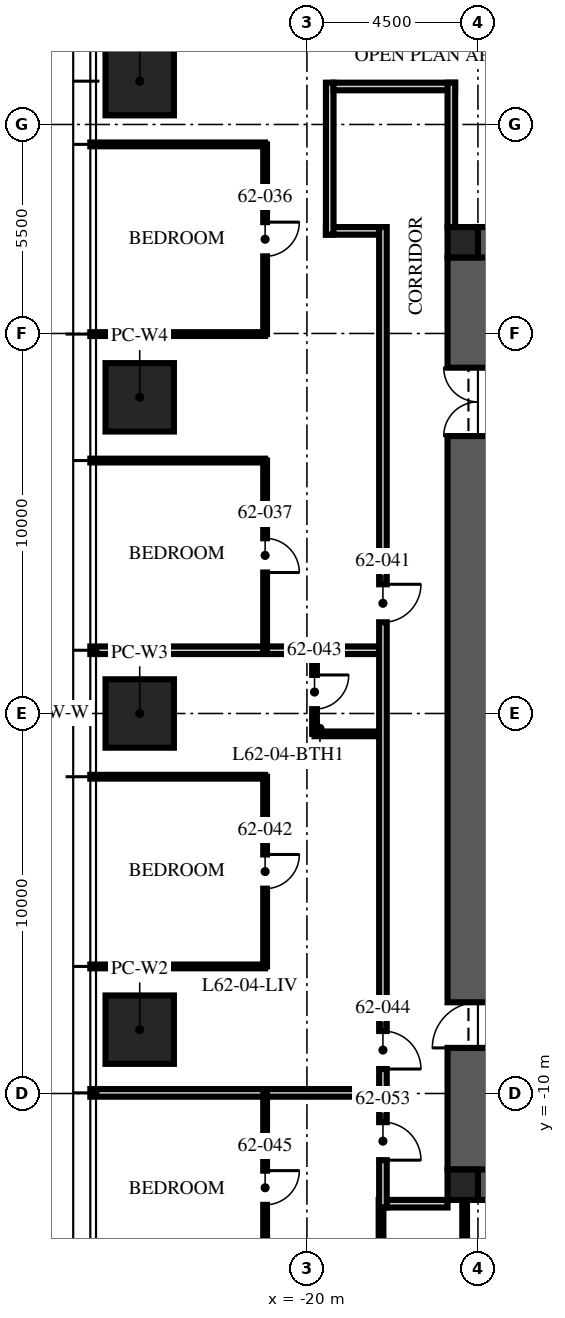
"""IFC4 building model, lengths in metres.
Left out: names, types, materials, properties, quantities, classifications, styles, units other than length and angle.
Written with IfcOpenShell. Run it as: python <this file> out.ifc"""

import sys

from ifc_helpers import new_model, si_unit, direction, frame, frame_2d, origin, origin_2d, place, context, subcontext, project, spatial, rectangle, extrude, element, fill, save


model = new_model("IFC4")
c1 = context("Model", 3, precision=1e-05, world=origin(), true_north=direction((0.0, 1.0)))
c2 = subcontext(c1, "Body", "Model", "MODEL_VIEW")
j1 = project(units=[si_unit("LENGTHUNIT", "METRE"), si_unit("PLANEANGLEUNIT", "RADIAN")], contexts=[c1])
p1 = place(None, origin())
s1 = spatial("IfcSite", under=j1, at=p1, CompositionType="ELEMENT")
p2 = place(p1, origin())
s2 = spatial("IfcBuilding", under=s1, at=p2, CompositionType="ELEMENT")
p3 = place(p2, frame((0.0, 0.0, 248.25)))
s3 = spatial("IfcBuildingStorey", under=s2, at=p3, CompositionType="ELEMENT", Elevation=248.25)
for number, where, z_axis, x_axis in (
    (1, (-15.5, 12.0, -0.25), (0.0, 0.0, 1.0), (1.0, 0.0, 0.0)),
    (2, (-15.5, -12.0, -0.25), (0.0, 0.0, 1.0), (1.0, 0.0, 0.0)),
):
    element("IfcWall", number, at=place(p3, frame(where, z_axis=z_axis, x_axis=x_axis)), inside=s3, PredefinedType="SHEAR", context=c2, shape_type="SweptSolid", body=[
        extrude(rectangle(XDim=31.0, YDim=1.6, at=frame_2d((15.5, 0.0))), origin(), (0.0, 0.0, 1.0), 3.75),
    ])
p4 = place(p3, frame((-15.5, -12.0, -0.25), z_axis=(0.0, 0.0, 1.0), x_axis=(0.0, 1.0, 0.0)))
e3 = element("IfcWall", 3, at=p4, inside=s3, PredefinedType="SHEAR", context=c2, shape_type="SweptSolid", body=[
    extrude(rectangle(XDim=24.0, YDim=1.6, at=frame_2d((12.0, 0.0))), origin(), (0.0, 0.0, 1.0), 3.75),
])
p5 = place(p4, frame((3.2, 0.0, 0.25)))
e4 = element("IfcOpeningElement", 4, at=p5, cuts=e3, PredefinedType="OPENING", context=c2, shape_type="SweptSolid", body=[
    extrude(rectangle(XDim=1.2, YDim=2.1, at=frame_2d((0.6, 1.05))), frame((0.0, 0.81, 0.0), z_axis=(0.0, -1.0, 0.0), x_axis=(1.0, 0.0, 0.0)), (0.0, 0.0, 1.0), 1.62),
])
p6 = place(p4, frame((19.3, 0.0, 0.25)))
e5 = element("IfcOpeningElement", 5, at=p6, cuts=e3, PredefinedType="OPENING", context=c2, shape_type="SweptSolid", body=[
    extrude(rectangle(XDim=1.8, YDim=2.1, at=frame_2d((0.9, 1.05))), frame((0.0, 0.81, 0.0), z_axis=(0.0, -1.0, 0.0), x_axis=(1.0, 0.0, 0.0)), (0.0, 0.0, 1.0), 1.62),
])
for number, where, z_axis, x_axis in (
    (6, (-15.9, 12.4, -0.25), (0.0, 0.0, 1.0), (1.0, 0.0, 0.0)),
    (7, (-15.9, -12.4, -0.25), (0.0, 0.0, 1.0), (1.0, 0.0, 0.0)),
):
    element("IfcColumn", number, at=place(p3, frame(where, z_axis=z_axis, x_axis=x_axis)), inside=s3, PredefinedType="COLUMN", context=c2, shape_type="SweptSolid", body=[
        extrude(rectangle(XDim=0.8, YDim=0.8, at=origin_2d()), origin(), (0.0, 0.0, 1.0), 3.75),
    ])
for number, where, z_axis, x_axis in (
    (8, (-24.4, -8.32, 0.0), (0.0, 0.0, 1.0), (0.0, 1.0, 0.0)),
    (9, (-24.4, 0.0, 0.0), (0.0, 0.0, 1.0), (0.0, 1.0, 0.0)),
    (10, (-24.4, 8.32, 0.0), (0.0, 0.0, 1.0), (0.0, 1.0, 0.0)),
    (11, (-24.4, 16.64, 0.0), (0.0, 0.0, 1.0), (0.0, 1.0, 0.0)),
):
    element("IfcColumn", number, at=place(p3, frame(where, z_axis=z_axis, x_axis=x_axis)), inside=s3, PredefinedType="COLUMN", context=c2, shape_type="SweptSolid", body=[
        extrude(rectangle(XDim=1.8, YDim=1.8, at=origin_2d()), origin(), (0.0, 0.0, 1.0), 3.75),
    ])
p7 = place(p3, frame((-18.1, 12.7, 0.0), z_axis=(0.0, 0.0, 1.0), x_axis=(-1.0, 0.0, 0.0)))
e12 = element("IfcWall", 12, at=p7, inside=s3, PredefinedType="PARTITIONING", context=c2, shape_type="SweptSolid", body=[
    extrude(rectangle(XDim=1.4, YDim=0.2, at=frame_2d((0.7, 0.0))), origin(), (0.0, 0.0, 1.0), 2.81),
])
p8 = place(p3, frame((-19.4, 12.6, 0.0), z_axis=(0.0, 0.0, 1.0), x_axis=(0.0, 1.0, 0.0)))
e13 = element("IfcWall", 13, at=p8, inside=s3, PredefinedType="PARTITIONING", context=c2, shape_type="SweptSolid", body=[
    extrude(rectangle(XDim=4.0, YDim=0.2, at=frame_2d((2.0, 0.0))), origin(), (0.0, 0.0, 1.0), 2.6),
])
p9 = place(p3, frame((-19.3, 16.5, 0.0), z_axis=(0.0, 0.0, 1.0), x_axis=(1.0, 0.0, 0.0)))
e14 = element("IfcWall", 14, at=p9, inside=s3, PredefinedType="PARTITIONING", context=c2, shape_type="SweptSolid", body=[
    extrude(rectangle(XDim=3.2, YDim=0.2, at=frame_2d((1.6, 0.0))), origin(), (0.0, 0.0, 1.0), 2.3),
])
p10 = place(p3, frame((-16.2, 16.6, 0.0), z_axis=(0.0, 0.0, 1.0), x_axis=(0.0, -1.0, 0.0)))
e15 = element("IfcWall", 15, at=p10, inside=s3, PredefinedType="PARTITIONING", context=c2, shape_type="SweptSolid", body=[
    extrude(rectangle(XDim=3.8, YDim=0.2, at=frame_2d((1.9, 0.0))), origin(), (0.0, 0.0, 1.0), 2.3),
])
p11 = place(p3, frame((-16.3, -12.9, 0.0), z_axis=(0.0, 0.0, 1.0), x_axis=(-1.0, 0.0, 0.0)))
e16 = element("IfcWall", 16, at=p11, inside=s3, PredefinedType="PARTITIONING", context=c2, shape_type="SweptSolid", body=[
    extrude(rectangle(XDim=1.6, YDim=0.2, at=frame_2d((0.8, 0.0))), origin(), (0.0, 0.0, 1.0), 2.3),
])
for number, where, z_axis, x_axis in (
    (17, (-21.1, 14.976, 0.0), (0.0, 0.0, 1.0), (-1.0, 0.0, 0.0)),
    (18, (-21.1, 9.984, 0.0), (0.0, 0.0, 1.0), (-1.0, 0.0, 0.0)),
    (19, (-21.1, 6.656, 0.0), (0.0, 0.0, 1.0), (-1.0, 0.0, 0.0)),
):
    element("IfcWall", number, at=place(p3, frame(where, z_axis=z_axis, x_axis=x_axis)), inside=s3, PredefinedType="PARTITIONING", context=c2, shape_type="SweptSolid", body=[
        extrude(rectangle(XDim=4.6, YDim=0.1, at=frame_2d((2.3, 0.0))), origin(), (0.0, 0.0, 1.0), 2.91),
    ])
p12 = place(p3, frame((-18.1, 1.664, 0.0), z_axis=(0.0, 0.0, 1.0), x_axis=(-1.0, 0.0, 0.0)))
e20 = element("IfcWall", 20, at=p12, inside=s3, PredefinedType="PARTITIONING", context=c2, shape_type="SweptSolid", body=[
    extrude(rectangle(XDim=7.6, YDim=0.2, at=frame_2d((3.8, 0.0))), origin(), (0.0, 0.0, 1.0), 2.91),
])
for number, where, z_axis, x_axis in (
    (21, (-21.1, -1.664, 0.0), (0.0, 0.0, 1.0), (-1.0, 0.0, 0.0)),
    (22, (-21.1, -6.656, 0.0), (0.0, 0.0, 1.0), (-1.0, 0.0, 0.0)),
):
    element("IfcWall", number, at=place(p3, frame(where, z_axis=z_axis, x_axis=x_axis)), inside=s3, PredefinedType="PARTITIONING", context=c2, shape_type="SweptSolid", body=[
        extrude(rectangle(XDim=4.6, YDim=0.1, at=frame_2d((2.3, 0.0))), origin(), (0.0, 0.0, 1.0), 2.91),
    ])
p13 = place(p3, frame((-18.1, -9.984, 0.0), z_axis=(0.0, 0.0, 1.0), x_axis=(-1.0, 0.0, 0.0)))
e23 = element("IfcWall", 23, at=p13, inside=s3, PredefinedType="PARTITIONING", context=c2, shape_type="SweptSolid", body=[
    extrude(rectangle(XDim=7.6, YDim=0.2, at=frame_2d((3.8, 0.0))), origin(), (0.0, 0.0, 1.0), 2.91),
])
p14 = place(p3, frame((-21.1, 14.976, 0.0), z_axis=(0.0, 0.0, 1.0), x_axis=(0.0, -1.0, 0.0)))
e24 = element("IfcWall", 24, at=p14, inside=s3, PredefinedType="PARTITIONING", context=c2, shape_type="SweptSolid", body=[
    extrude(rectangle(XDim=4.992, YDim=0.1, at=frame_2d((2.496, 0.0))), origin(), (0.0, 0.0, 1.0), 2.81),
])
p15 = place(p14, frame((2.046, 0.0, 0.0)))
e25 = element("IfcOpeningElement", 25, at=p15, cuts=e24, PredefinedType="OPENING", context=c2, shape_type="SweptSolid", body=[
    extrude(rectangle(XDim=0.9, YDim=2.1, at=frame_2d((0.45, 1.05))), frame((0.0, 0.06, 0.0), z_axis=(0.0, -1.0, 0.0), x_axis=(1.0, 0.0, 0.0)), (0.0, 0.0, 1.0), 0.12),
])
p16 = place(p3, frame((-21.1, 6.656, 0.0), z_axis=(0.0, 0.0, 1.0), x_axis=(0.0, -1.0, 0.0)))
e26 = element("IfcWall", 26, at=p16, inside=s3, PredefinedType="PARTITIONING", context=c2, shape_type="SweptSolid", body=[
    extrude(rectangle(XDim=4.992, YDim=0.1, at=frame_2d((2.496, 0.0))), origin(), (0.0, 0.0, 1.0), 2.81),
])
p17 = place(p16, frame((2.046, 0.0, 0.0)))
e27 = element("IfcOpeningElement", 27, at=p17, cuts=e26, PredefinedType="OPENING", context=c2, shape_type="SweptSolid", body=[
    extrude(rectangle(XDim=0.9, YDim=2.1, at=frame_2d((0.45, 1.05))), frame((0.0, 0.06, 0.0), z_axis=(0.0, -1.0, 0.0), x_axis=(1.0, 0.0, 0.0)), (0.0, 0.0, 1.0), 0.12),
])
p18 = place(p3, frame((-21.1, -1.664, 0.0), z_axis=(0.0, 0.0, 1.0), x_axis=(0.0, -1.0, 0.0)))
e28 = element("IfcWall", 28, at=p18, inside=s3, PredefinedType="PARTITIONING", context=c2, shape_type="SweptSolid", body=[
    extrude(rectangle(XDim=4.992, YDim=0.1, at=frame_2d((2.496, 0.0))), origin(), (0.0, 0.0, 1.0), 2.81),
])
p19 = place(p18, frame((2.046, 0.0, 0.0)))
e29 = element("IfcOpeningElement", 29, at=p19, cuts=e28, PredefinedType="OPENING", context=c2, shape_type="SweptSolid", body=[
    extrude(rectangle(XDim=0.9, YDim=2.1, at=frame_2d((0.45, 1.05))), frame((0.0, 0.06, 0.0), z_axis=(0.0, -1.0, 0.0), x_axis=(1.0, 0.0, 0.0)), (0.0, 0.0, 1.0), 0.12),
])
p20 = place(p3, frame((-19.8, 1.664, 0.0), z_axis=(0.0, 0.0, 1.0), x_axis=(0.0, -1.0, 0.0)))
e30 = element("IfcWall", 30, at=p20, inside=s3, PredefinedType="PARTITIONING", context=c2, shape_type="SweptSolid", body=[
    extrude(rectangle(XDim=2.2, YDim=0.125, at=frame_2d((1.1, 0.0))), origin(), (0.0, 0.0, 1.0), 2.6),
])
p21 = place(p20, frame((0.65, 0.0, 0.0)))
e31 = element("IfcOpeningElement", 31, at=p21, cuts=e30, PredefinedType="OPENING", context=c2, shape_type="SweptSolid", body=[
    extrude(rectangle(XDim=0.9, YDim=2.1, at=frame_2d((0.45, 1.05))), frame((0.0, 0.073, 0.0), z_axis=(0.0, -1.0, 0.0), x_axis=(1.0, 0.0, 0.0)), (0.0, 0.0, 1.0), 0.145),
])
p22 = place(p3, frame((-18.1, -0.536, 0.0), z_axis=(0.0, 0.0, 1.0), x_axis=(-1.0, 0.0, 0.0)))
e32 = element("IfcWall", 32, at=p22, inside=s3, PredefinedType="PARTITIONING", context=c2, shape_type="SweptSolid", body=[
    extrude(rectangle(XDim=1.7, YDim=0.125, at=frame_2d((0.85, 0.0))), origin(), (0.0, 0.0, 1.0), 3.5),
])
p23 = place(p3, frame((-21.1, -9.984, 0.0), z_axis=(0.0, 0.0, 1.0), x_axis=(0.0, -1.0, 0.0)))
e33 = element("IfcWall", 33, at=p23, inside=s3, PredefinedType="PARTITIONING", context=c2, shape_type="SweptSolid", body=[
    extrude(rectangle(XDim=4.992, YDim=0.1, at=frame_2d((2.496, 0.0))), origin(), (0.0, 0.0, 1.0), 2.81),
])
p24 = place(p23, frame((2.046, 0.0, 0.0)))
e34 = element("IfcOpeningElement", 34, at=p24, cuts=e33, PredefinedType="OPENING", context=c2, shape_type="SweptSolid", body=[
    extrude(rectangle(XDim=0.9, YDim=2.1, at=frame_2d((0.45, 1.05))), frame((0.0, 0.06, 0.0), z_axis=(0.0, -1.0, 0.0), x_axis=(1.0, 0.0, 0.0)), (0.0, 0.0, 1.0), 0.12),
])
for number, where, z_axis, x_axis in (
    (35, (-18.05, -12.8, 0.0), (0.0, 0.0, 1.0), (0.0, -1.0, 0.0)),
    (36, (-15.85, -12.8, 0.0), (0.0, 0.0, 1.0), (0.0, -1.0, 0.0)),
):
    element("IfcWall", number, at=place(p3, frame(where, z_axis=z_axis, x_axis=x_axis)), inside=s3, PredefinedType="PARTITIONING", context=c2, shape_type="SweptSolid", body=[
        extrude(rectangle(XDim=2.8, YDim=0.125, at=frame_2d((1.4, 0.0))), origin(), (0.0, 0.0, 1.0), 2.3),
    ])
p25 = place(p3, frame((-18.0, 12.8, 0.0), z_axis=(0.0, 0.0, 1.0), x_axis=(0.0, -1.0, 0.0)))
e37 = element("IfcWall", 37, at=p25, inside=s3, PredefinedType="PARTITIONING", context=c2, shape_type="SweptSolid", body=[
    extrude(rectangle(XDim=25.8, YDim=0.2, at=frame_2d((12.9, 0.0))), origin(), (0.0, 0.0, 1.0), 2.6),
])
p26 = place(p25, frame((9.4, 0.0, 0.0)))
e38 = element("IfcOpeningElement", 38, at=p26, cuts=e37, PredefinedType="OPENING", context=c2, shape_type="SweptSolid", body=[
    extrude(rectangle(XDim=1.0, YDim=2.2, at=frame_2d((0.5, 1.1))), frame((0.0, 0.11, 0.0), z_axis=(0.0, -1.0, 0.0), x_axis=(1.0, 0.0, 0.0)), (0.0, 0.0, 1.0), 0.22),
])
p27 = place(p25, frame((21.156, 0.0, 0.0)))
e39 = element("IfcOpeningElement", 39, at=p27, cuts=e37, PredefinedType="OPENING", context=c2, shape_type="SweptSolid", body=[
    extrude(rectangle(XDim=1.0, YDim=2.2, at=frame_2d((0.5, 1.1))), frame((0.0, 0.11, 0.0), z_axis=(0.0, -1.0, 0.0), x_axis=(1.0, 0.0, 0.0)), (0.0, 0.0, 1.0), 0.22),
])
p28 = place(p25, frame((23.554, 0.0, 0.0)))
e40 = element("IfcOpeningElement", 40, at=p28, cuts=e37, PredefinedType="OPENING", context=c2, shape_type="SweptSolid", body=[
    extrude(rectangle(XDim=1.0, YDim=2.2, at=frame_2d((0.5, 1.1))), frame((0.0, 0.11, 0.0), z_axis=(0.0, -1.0, 0.0), x_axis=(1.0, 0.0, 0.0)), (0.0, 0.0, 1.0), 0.22),
])
p29 = place(p5, origin())
e41 = element("IfcDoor", 41, at=p29, inside=s3, OperationType="SINGLE_SWING_LEFT", PredefinedType="DOOR", context=c2, shape_type="SweptSolid", body=[
    extrude(rectangle(XDim=1.2, YDim=2.1, at=frame_2d((0.6, 1.05))), frame((0.0, 0.025, 0.0), z_axis=(0.0, -1.0, 0.0), x_axis=(1.0, 0.0, 0.0)), (0.0, 0.0, 1.0), 0.05),
])
fill(e4, e41)
p30 = place(p6, origin())
e42 = element("IfcDoor", 42, at=p30, inside=s3, OperationType="DOUBLE_DOOR_SINGLE_SWING", PredefinedType="DOOR", context=c2, shape_type="SweptSolid", body=[
    extrude(rectangle(XDim=1.8, YDim=2.1, at=frame_2d((0.9, 1.05))), frame((0.0, 0.025, 0.0), z_axis=(0.0, -1.0, 0.0), x_axis=(1.0, 0.0, 0.0)), (0.0, 0.0, 1.0), 0.05),
])
fill(e5, e42)
p31 = place(p15, origin())
e43 = element("IfcDoor", 43, at=p31, inside=s3, OperationType="SINGLE_SWING_LEFT", PredefinedType="DOOR", context=c2, shape_type="SweptSolid", body=[
    extrude(rectangle(XDim=0.9, YDim=2.1, at=frame_2d((0.45, 1.05))), frame((0.0, 0.025, 0.0), z_axis=(0.0, -1.0, 0.0), x_axis=(1.0, 0.0, 0.0)), (0.0, 0.0, 1.0), 0.05),
])
fill(e25, e43)
p32 = place(p17, origin())
e44 = element("IfcDoor", 44, at=p32, inside=s3, OperationType="SINGLE_SWING_RIGHT", PredefinedType="DOOR", context=c2, shape_type="SweptSolid", body=[
    extrude(rectangle(XDim=0.9, YDim=2.1, at=frame_2d((0.45, 1.05))), frame((0.0, 0.025, 0.0), z_axis=(0.0, -1.0, 0.0), x_axis=(1.0, 0.0, 0.0)), (0.0, 0.0, 1.0), 0.05),
])
fill(e27, e44)
p33 = place(p26, origin())
e45 = element("IfcDoor", 45, at=p33, inside=s3, OperationType="SINGLE_SWING_LEFT", PredefinedType="DOOR", context=c2, shape_type="SweptSolid", body=[
    extrude(rectangle(XDim=1.0, YDim=2.2, at=frame_2d((0.5, 1.1))), frame((0.0, 0.025, 0.0), z_axis=(0.0, -1.0, 0.0), x_axis=(1.0, 0.0, 0.0)), (0.0, 0.0, 1.0), 0.05),
])
fill(e38, e45)
p34 = place(p19, origin())
e46 = element("IfcDoor", 46, at=p34, inside=s3, OperationType="SINGLE_SWING_LEFT", PredefinedType="DOOR", context=c2, shape_type="SweptSolid", body=[
    extrude(rectangle(XDim=0.9, YDim=2.1, at=frame_2d((0.45, 1.05))), frame((0.0, 0.025, 0.0), z_axis=(0.0, -1.0, 0.0), x_axis=(1.0, 0.0, 0.0)), (0.0, 0.0, 1.0), 0.05),
])
fill(e29, e46)
p35 = place(p21, origin())
e47 = element("IfcDoor", 47, at=p35, inside=s3, OperationType="SINGLE_SWING_LEFT", PredefinedType="DOOR", context=c2, shape_type="SweptSolid", body=[
    extrude(rectangle(XDim=0.9, YDim=2.1, at=frame_2d((0.45, 1.05))), frame((0.0, 0.025, 0.0), z_axis=(0.0, -1.0, 0.0), x_axis=(1.0, 0.0, 0.0)), (0.0, 0.0, 1.0), 0.05),
])
fill(e31, e47)
p36 = place(p27, origin())
e48 = element("IfcDoor", 48, at=p36, inside=s3, OperationType="SINGLE_SWING_RIGHT", PredefinedType="DOOR", context=c2, shape_type="SweptSolid", body=[
    extrude(rectangle(XDim=1.0, YDim=2.2, at=frame_2d((0.5, 1.1))), frame((0.0, 0.025, 0.0), z_axis=(0.0, -1.0, 0.0), x_axis=(1.0, 0.0, 0.0)), (0.0, 0.0, 1.0), 0.05),
])
fill(e39, e48)
p37 = place(p24, origin())
e49 = element("IfcDoor", 49, at=p37, inside=s3, OperationType="SINGLE_SWING_LEFT", PredefinedType="DOOR", context=c2, shape_type="SweptSolid", body=[
    extrude(rectangle(XDim=0.9, YDim=2.1, at=frame_2d((0.45, 1.05))), frame((0.0, 0.025, 0.0), z_axis=(0.0, -1.0, 0.0), x_axis=(1.0, 0.0, 0.0)), (0.0, 0.0, 1.0), 0.05),
])
fill(e34, e49)
p38 = place(p28, origin())
e50 = element("IfcDoor", 50, at=p38, inside=s3, OperationType="SINGLE_SWING_RIGHT", PredefinedType="DOOR", context=c2, shape_type="SweptSolid", body=[
    extrude(rectangle(XDim=1.0, YDim=2.2, at=frame_2d((0.5, 1.1))), frame((0.0, 0.025, 0.0), z_axis=(0.0, -1.0, 0.0), x_axis=(1.0, 0.0, 0.0)), (0.0, 0.0, 1.0), 0.05),
])
fill(e40, e50)
save(model, sys.argv[1])
